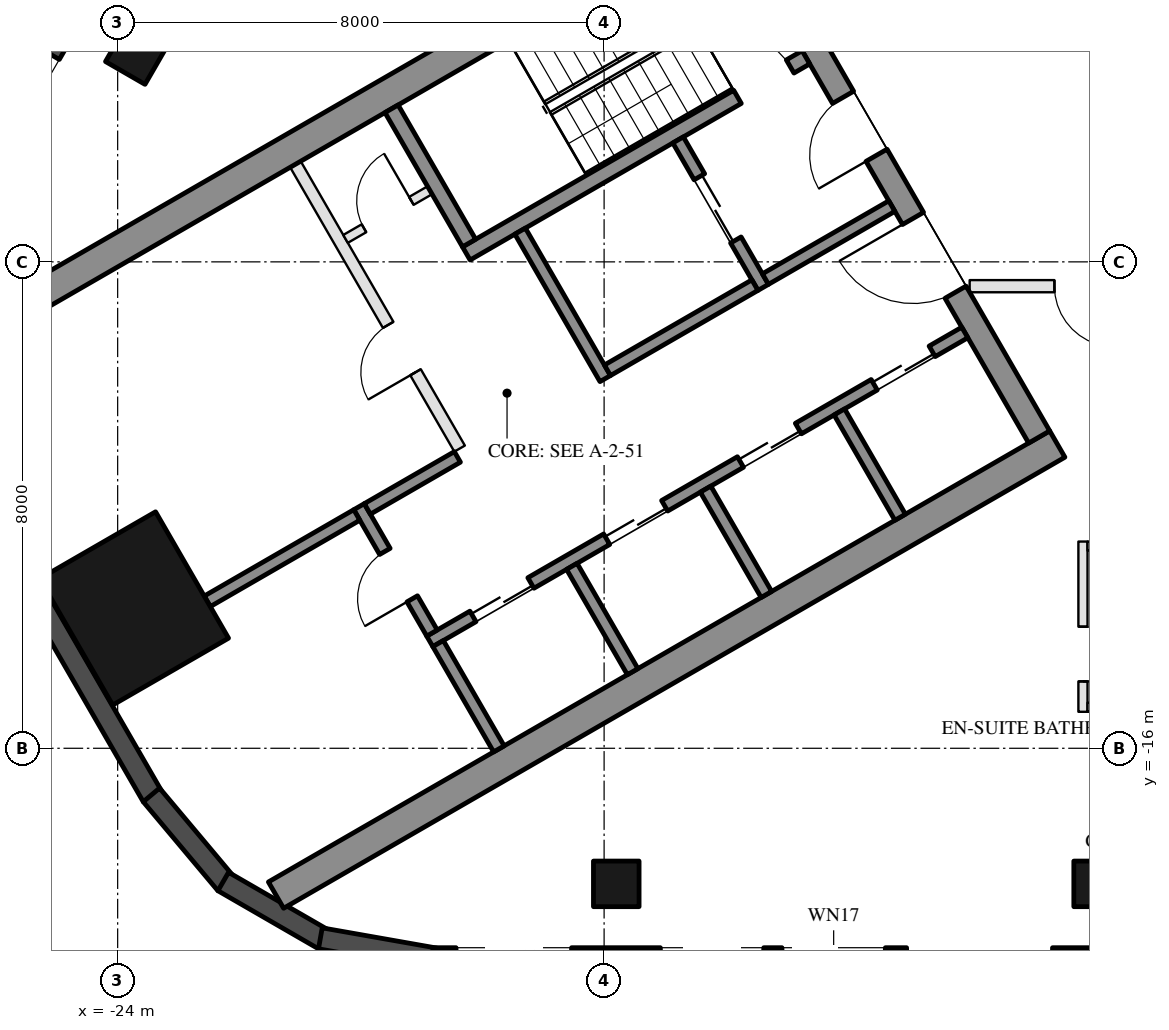
"""IFC4 building model, lengths in metres.
Left out: names, types, materials, properties, quantities, classifications, styles, units other than length and angle.
Written with IfcOpenShell. Run it as: python <this file> out.ifc"""

import sys

from ifc_helpers import new_model, si_unit, direction, frame, frame_2d, origin, origin_2d, place, context, subcontext, project, spatial, rectangle, hollow_rectangle, extrude, element, fill, save


model = new_model("IFC4")
c1 = context("Model", 3, precision=1e-05, world=origin(), true_north=direction((0.0, 1.0)))
c2 = subcontext(c1, "Body", "Model", "MODEL_VIEW")
j1 = project(units=[si_unit("LENGTHUNIT", "METRE"), si_unit("PLANEANGLEUNIT", "RADIAN")], contexts=[c1])
p1 = place(None, origin())
s1 = spatial("IfcSite", under=j1, at=p1, CompositionType="ELEMENT")
p2 = place(p1, origin())
s2 = spatial("IfcBuilding", under=s1, at=p2, CompositionType="ELEMENT")
p3 = place(p2, frame((0.0, 0.0, 220.6)))
s3 = spatial("IfcBuildingStorey", under=s2, at=p3, CompositionType="ELEMENT", Elevation=220.6)
for number, where, z_axis, x_axis in (
    (1, (-15.8, -18.23, 0.0), (0.0, 0.0, 1.0), (-1.0, 0.0, 0.0)),
    (2, (-7.9, -18.23, 0.0), (0.0, 0.0, 1.0), (-1.0, 0.0, 0.0)),
    (3, (-23.688, -4.568, 0.0), (0.0, 0.0, 1.0), (0.5, 0.866, 0.0)),
):
    element("IfcColumn", number, at=place(p3, frame(where, z_axis=z_axis, x_axis=x_axis)), inside=s3, PredefinedType="COLUMN", context=c2, shape_type="SweptSolid", body=[
        extrude(hollow_rectangle(XDim=0.75, YDim=0.75, WallThickness=0.035, at=origin_2d()), origin(), (0.0, 0.0, 1.0), 3.7),
    ])
p4 = place(p3, frame((-23.729, -13.7, 0.0), z_axis=(0.0, 0.0, 1.0), x_axis=(-0.5, 0.866025403784, 0.0)))
e4 = element("IfcColumn", 4, at=p4, inside=s3, PredefinedType="COLUMN", context=c2, shape_type="SweptSolid", body=[
    extrude(hollow_rectangle(XDim=2.4, YDim=2.2, WallThickness=0.06, at=origin_2d()), origin(), (0.0, 0.0, 1.0), 3.7),
])
p5 = place(p3, frame((-24.299, -3.176, 0.0), z_axis=(0.0, 0.0, 1.0), x_axis=(-0.500028278809, -0.866009076391, 0.0)))
e5 = element("IfcWall", 5, at=p5, inside=s3, PredefinedType="SOLIDWALL", context=c2, shape_type="SweptSolid", body=[
    extrude(rectangle(XDim=3.916, YDim=0.35, at=frame_2d((1.958, 0.0))), origin(), (0.0, 0.0, 1.0), 3.55),
])
p6 = place(p5, frame((1.625, 0.0, 0.3)))
e6 = element("IfcOpeningElement", 6, at=p6, cuts=e5, PredefinedType="OPENING", context=c2, shape_type="SweptSolid", body=[
    extrude(rectangle(XDim=1.9, YDim=2.65, at=frame_2d((0.95, 1.325))), frame((0.0, 0.185, 0.0), z_axis=(0.0, -1.0, 0.0), x_axis=(1.0, 0.0, 0.0)), (0.0, 0.0, 1.0), 0.37),
])
p7 = place(p3, frame((-26.257, -11.893, 0.0), z_axis=(0.0, 0.0, 1.0), x_axis=(0.500018773155, -0.866014564827, 0.0)))
e7 = element("IfcWall", 7, at=p7, inside=s3, PredefinedType="SOLIDWALL", context=c2, shape_type="SweptSolid", body=[
    extrude(rectangle(XDim=5.658, YDim=0.35, at=frame_2d((2.829, 0.0))), origin(), (0.0, 0.0, 1.0), 3.55),
])
for number, where, z_axis, x_axis in (
    (8, (-23.445, -16.768, 0.0), (0.0, 0.0, 1.0), (0.643, -0.766, 0.0)),
    (9, (-22.264, -18.192, 0.0), (0.0, 0.0, 1.0), (0.866, -0.5, 0.0)),
):
    element("IfcWall", number, at=place(p3, frame(where, z_axis=z_axis, x_axis=x_axis)), inside=s3, PredefinedType="SOLIDWALL", context=c2, shape_type="SweptSolid", body=[
        extrude(rectangle(XDim=1.91, YDim=0.35, at=frame_2d((0.955, 0.0))), origin(), (0.0, 0.0, 1.0), 3.55),
    ])
p8 = place(p3, frame((-20.667, -19.126, 0.0), z_axis=(0.0, 0.0, 1.0), x_axis=(0.984798995425, -0.173697837091, 0.0)))
e10 = element("IfcWall", 10, at=p8, inside=s3, PredefinedType="SOLIDWALL", context=c2, shape_type="SweptSolid", body=[
    extrude(rectangle(XDim=1.91, YDim=0.35, at=frame_2d((0.955, 0.0))), origin(), (0.0, 0.0, 1.0), 3.55),
])
p9 = place(p3, frame((-18.816, -19.455, 0.0), z_axis=(0.0, 0.0, 1.0), x_axis=(1.0, 0.0, 0.0)))
e11 = element("IfcWall", 11, at=p9, inside=s3, PredefinedType="SOLIDWALL", context=c2, shape_type="SweptSolid", body=[
    extrude(rectangle(XDim=11.816, YDim=0.35, at=frame_2d((5.908, 0.0))), origin(), (0.0, 0.0, 1.0), 3.55),
])
p10 = place(p9, frame((0.381, 0.0, 0.3)))
e12 = element("IfcOpeningElement", 12, at=p10, cuts=e11, PredefinedType="OPENING", context=c2, shape_type="SweptSolid", body=[
    extrude(rectangle(XDim=1.9, YDim=2.65, at=frame_2d((0.95, 1.325))), frame((0.0, 0.185, 0.0), z_axis=(0.0, -1.0, 0.0), x_axis=(1.0, 0.0, 0.0)), (0.0, 0.0, 1.0), 0.37),
])
p11 = place(p9, frame((7.79, 0.0, 0.0)))
e13 = element("IfcOpeningElement", 13, at=p11, cuts=e11, PredefinedType="OPENING", context=c2, shape_type="SweptSolid", body=[
    extrude(rectangle(XDim=2.4, YDim=2.4, at=frame_2d((1.2, 1.2))), frame((0.0, 0.185, 0.0), z_axis=(0.0, -1.0, 0.0), x_axis=(1.0, 0.0, 0.0)), (0.0, 0.0, 1.0), 0.37),
])
p12 = place(p9, frame((3.741, 0.0, 0.3)))
e14 = element("IfcOpeningElement", 14, at=p12, cuts=e11, PredefinedType="OPENING", context=c2, shape_type="SweptSolid", body=[
    extrude(rectangle(XDim=1.7, YDim=2.65, at=frame_2d((0.85, 1.325))), frame((0.0, 0.185, 0.0), z_axis=(0.0, -1.0, 0.0), x_axis=(1.0, 0.0, 0.0)), (0.0, 0.0, 1.0), 0.37),
])
p13 = place(p9, frame((5.741, 0.0, 0.3)))
e15 = element("IfcOpeningElement", 15, at=p13, cuts=e11, PredefinedType="OPENING", context=c2, shape_type="SweptSolid", body=[
    extrude(rectangle(XDim=1.7, YDim=2.65, at=frame_2d((0.85, 1.325))), frame((0.0, 0.185, 0.0), z_axis=(0.0, -1.0, 0.0), x_axis=(1.0, 0.0, 0.0)), (0.0, 0.0, 1.0), 0.37),
])
for number, where, z_axis, x_axis in (
    (16, (-13.797, -1.903, 0.0), (0.0, 0.0, 1.0), (-0.866, -0.5, 0.0)),
    (17, (-8.547, -10.997, 0.0), (0.0, 0.0, 1.0), (-0.866, -0.5, 0.0)),
):
    element("IfcWall", number, at=place(p3, frame(where, z_axis=z_axis, x_axis=x_axis)), inside=s3, PredefinedType="SHEAR", context=c2, shape_type="SweptSolid", body=[
        extrude(rectangle(XDim=14.837, YDim=0.5, at=frame_2d((7.418, 0.0))), origin(), (0.0, 0.0, 1.0), 3.5),
    ])
p14 = place(p3, frame((-13.845, -2.22, 0.0), z_axis=(0.0, 0.0, 1.0), x_axis=(0.500004234368, -0.866022959057, 0.0)))
e18 = element("IfcWall", 18, at=p14, inside=s3, PredefinedType="SHEAR", context=c2, shape_type="SweptSolid", body=[
    extrude(rectangle(XDim=10.0, YDim=0.4, at=frame_2d((5.0, 0.0))), origin(), (0.0, 0.0, 1.0), 3.5),
])
p15 = place(p14, frame((3.55, 0.0, 0.0)))
e19 = element("IfcOpeningElement", 19, at=p15, cuts=e18, PredefinedType="OPENING", context=c2, shape_type="SweptSolid", body=[
    extrude(rectangle(XDim=1.1, YDim=2.1, at=frame_2d((0.55, 1.05))), frame((0.0, 0.21, 0.0), z_axis=(0.0, -1.0, 0.0), x_axis=(1.0, 0.0, 0.0)), (0.0, 0.0, 1.0), 0.42),
])
p16 = place(p14, frame((5.85, 0.0, 0.0)))
e20 = element("IfcOpeningElement", 20, at=p16, cuts=e18, PredefinedType="OPENING", context=c2, shape_type="SweptSolid", body=[
    extrude(rectangle(XDim=1.4, YDim=2.1, at=frame_2d((0.7, 1.05))), frame((0.0, 0.21, 0.0), z_axis=(0.0, -1.0, 0.0), x_axis=(1.0, 0.0, 0.0)), (0.0, 0.0, 1.0), 0.42),
])
p17 = place(p3, frame((-12.681, -4.636, 0.0), z_axis=(0.0, 0.0, 1.0), x_axis=(-0.866021702275, -0.500006411147, 0.0)))
e21 = element("IfcWall", 21, at=p17, inside=s3, PredefinedType="SHEAR", context=c2, shape_type="SweptSolid", body=[
    extrude(rectangle(XDim=6.45, YDim=0.25, at=frame_2d((3.225, 0.0))), origin(), (0.0, 0.0, 1.0), 3.5),
])
p18 = place(p17, frame((0.3, 0.0, 0.0)))
e22 = element("IfcOpeningElement", 22, at=p18, cuts=e21, PredefinedType="OPENING", context=c2, shape_type="SweptSolid", body=[
    extrude(rectangle(XDim=1.0, YDim=2.1, at=frame_2d((0.5, 1.05))), frame((0.0, 0.135, 0.0), z_axis=(0.0, -1.0, 0.0), x_axis=(1.0, 0.0, 0.0)), (0.0, 0.0, 1.0), 0.27),
])
p19 = place(p3, frame((-19.496, -5.482, 0.0), z_axis=(0.0, 0.0, 1.0), x_axis=(0.499990435942, -0.866030925526, 0.0)))
e23 = element("IfcWall", 23, at=p19, inside=s3, PredefinedType="SHEAR", context=c2, shape_type="SweptSolid", body=[
    extrude(rectangle(XDim=2.55, YDim=0.25, at=frame_2d((1.275, 0.0))), origin(), (0.0, 0.0, 1.0), 3.5),
])
p20 = place(p3, frame((-17.381, -7.495, 0.0), z_axis=(0.0, 0.0, 1.0), x_axis=(0.500011755427, -0.866018616679, 0.0)))
e24 = element("IfcWall", 24, at=p20, inside=s3, PredefinedType="SHEAR", context=c2, shape_type="SweptSolid", body=[
    extrude(rectangle(XDim=2.8, YDim=0.2, at=frame_2d((1.4, 0.0))), origin(), (0.0, 0.0, 1.0), 3.5),
])
p21 = place(p3, frame((-14.783, -5.995, 0.0), z_axis=(0.0, 0.0, 1.0), x_axis=(0.49994636267, -0.866056369097, 0.0)))
e25 = element("IfcWall", 25, at=p21, inside=s3, PredefinedType="SHEAR", context=c2, shape_type="SweptSolid", body=[
    extrude(rectangle(XDim=2.8, YDim=0.2, at=frame_2d((1.4, 0.0))), origin(), (0.0, 0.0, 1.0), 3.5),
])
p22 = place(p21, frame((0.7, 0.0, 0.0)))
e26 = element("IfcOpeningElement", 26, at=p22, cuts=e25, PredefinedType="OPENING", context=c2, shape_type="SweptSolid", body=[
    extrude(rectangle(XDim=1.2, YDim=2.1, at=frame_2d((0.6, 1.05))), frame((0.0, 0.11, 0.0), z_axis=(0.0, -1.0, 0.0), x_axis=(1.0, 0.0, 0.0)), (0.0, 0.0, 1.0), 0.22),
])
p23 = place(p3, frame((-13.52, -8.383, 0.0), z_axis=(0.0, 0.0, 1.0), x_axis=(-0.866034573852, -0.49998411664, 0.0)))
e27 = element("IfcWall", 27, at=p23, inside=s3, PredefinedType="SHEAR", context=c2, shape_type="SweptSolid", body=[
    extrude(rectangle(XDim=2.8, YDim=0.2, at=frame_2d((1.4, 0.0))), origin(), (0.0, 0.0, 1.0), 3.5),
])
p24 = place(p3, frame((-11.268, -7.083, 0.0), z_axis=(0.0, 0.0, 1.0), x_axis=(-0.866050077142, -0.499957262057, 0.0)))
e28 = element("IfcWall", 28, at=p24, inside=s3, PredefinedType="SHEAR", context=c2, shape_type="SweptSolid", body=[
    extrude(rectangle(XDim=2.4, YDim=0.2, at=frame_2d((1.2, 0.0))), origin(), (0.0, 0.0, 1.0), 3.5),
])
p25 = place(p3, frame((-10.068, -9.162, 0.0), z_axis=(0.0, 0.0, 1.0), x_axis=(-0.866032725843, -0.499987317609, 0.0)))
e29 = element("IfcWall", 29, at=p25, inside=s3, PredefinedType="SHEAR", context=c2, shape_type="SweptSolid", body=[
    extrude(rectangle(XDim=10.16, YDim=0.2, at=frame_2d((5.08, 0.0))), origin(), (0.0, 0.0, 1.0), 3.5),
])
p26 = place(p25, frame((0.62, 0.0, 0.0)))
e30 = element("IfcOpeningElement", 30, at=p26, cuts=e29, PredefinedType="OPENING", context=c2, shape_type="SweptSolid", body=[
    extrude(rectangle(XDim=1.1, YDim=2.1, at=frame_2d((0.55, 1.05))), frame((0.0, 0.11, 0.0), z_axis=(0.0, -1.0, 0.0), x_axis=(1.0, 0.0, 0.0)), (0.0, 0.0, 1.0), 0.22),
])
p27 = place(p25, frame((3.16, 0.0, 0.0)))
e31 = element("IfcOpeningElement", 31, at=p27, cuts=e29, PredefinedType="OPENING", context=c2, shape_type="SweptSolid", body=[
    extrude(rectangle(XDim=1.1, YDim=2.1, at=frame_2d((0.55, 1.05))), frame((0.0, 0.11, 0.0), z_axis=(0.0, -1.0, 0.0), x_axis=(1.0, 0.0, 0.0)), (0.0, 0.0, 1.0), 0.22),
])
p28 = place(p25, frame((5.7, 0.0, 0.0)))
e32 = element("IfcOpeningElement", 32, at=p28, cuts=e29, PredefinedType="OPENING", context=c2, shape_type="SweptSolid", body=[
    extrude(rectangle(XDim=1.1, YDim=2.1, at=frame_2d((0.55, 1.05))), frame((0.0, 0.11, 0.0), z_axis=(0.0, -1.0, 0.0), x_axis=(1.0, 0.0, 0.0)), (0.0, 0.0, 1.0), 0.22),
])
p29 = place(p25, frame((8.24, 0.0, 0.0)))
e33 = element("IfcOpeningElement", 33, at=p29, cuts=e29, PredefinedType="OPENING", context=c2, shape_type="SweptSolid", body=[
    extrude(rectangle(XDim=1.1, YDim=2.1, at=frame_2d((0.55, 1.05))), frame((0.0, 0.11, 0.0), z_axis=(0.0, -1.0, 0.0), x_axis=(1.0, 0.0, 0.0)), (0.0, 0.0, 1.0), 0.22),
])
p30 = place(p3, frame((-20.031, -12.026, 0.0), z_axis=(0.0, 0.0, 1.0), x_axis=(0.500033551112, -0.866006032174, 0.0)))
e34 = element("IfcWall", 34, at=p30, inside=s3, PredefinedType="SHEAR", context=c2, shape_type="SweptSolid", body=[
    extrude(rectangle(XDim=2.4, YDim=0.2, at=frame_2d((1.2, 0.0))), origin(), (0.0, 0.0, 1.0), 3.5),
])
p31 = place(p30, frame((0.85, 0.0, 0.0)))
e35 = element("IfcOpeningElement", 35, at=p31, cuts=e34, PredefinedType="OPENING", context=c2, shape_type="SweptSolid", body=[
    extrude(rectangle(XDim=0.9, YDim=2.1, at=frame_2d((0.45, 1.05))), frame((0.0, 0.11, 0.0), z_axis=(0.0, -1.0, 0.0), x_axis=(1.0, 0.0, 0.0)), (0.0, 0.0, 1.0), 0.22),
])
p32 = place(p3, frame((-18.413, -11.208, 0.0), z_axis=(0.0, 0.0, 1.0), x_axis=(-0.866038183914, -0.499977863513, 0.0)))
e36 = element("IfcWall", 36, at=p32, inside=s3, PredefinedType="SHEAR", context=c2, shape_type="SweptSolid", body=[
    extrude(rectangle(XDim=1.71, YDim=0.2, at=frame_2d((0.855, 0.0))), origin(), (0.0, 0.0, 1.0), 3.5),
])
for number, where, z_axis, x_axis in (
    (37, (-12.131, -10.468, 0.0), (0.0, 0.0, 1.0), (0.5, -0.866, 0.0)),
    (38, (-14.331, -11.738, 0.0), (0.0, 0.0, 1.0), (0.5, -0.866, 0.0)),
    (39, (-16.531, -13.008, 0.0), (0.0, 0.0, 1.0), (0.5, -0.866, 0.0)),
    (40, (-18.73, -14.278, 0.0), (0.0, 0.0, 1.0), (0.5, -0.866, 0.0)),
):
    element("IfcWall", number, at=place(p3, frame(where, z_axis=z_axis, x_axis=x_axis)), inside=s3, PredefinedType="SHEAR", context=c2, shape_type="SweptSolid", body=[
        extrude(rectangle(XDim=2.0, YDim=0.2, at=frame_2d((1.0, 0.0))), origin(), (0.0, 0.0, 1.0), 3.5),
    ])
p33 = place(p3, frame((-20.067, -12.163, 0.0), z_axis=(0.0, 0.0, 1.0), x_axis=(-0.866055327414, -0.49994816717, 0.0)))
e41 = element("IfcWall", 41, at=p33, inside=s3, PredefinedType="SHEAR", context=c2, shape_type="SweptSolid", body=[
    extrude(rectangle(XDim=2.84, YDim=0.2, at=frame_2d((1.42, 0.0))), origin(), (0.0, 0.0, 1.0), 3.5),
])
p34 = place(p3, frame((-21.076, -6.395, 0.0), z_axis=(0.0, 0.0, 1.0), x_axis=(0.50001468107, -0.866016927499, 0.0)))
e42 = element("IfcWall", 42, at=p34, inside=s3, PredefinedType="PARTITIONING", context=c2, shape_type="SweptSolid", body=[
    extrude(rectangle(XDim=5.4, YDim=0.2, at=frame_2d((2.7, 0.0))), origin(), (0.0, 0.0, 1.0), 3.5),
])
p35 = place(p34, frame((3.05, 0.0, 0.0)))
e43 = element("IfcOpeningElement", 43, at=p35, cuts=e42, PredefinedType="OPENING", context=c2, shape_type="SweptSolid", body=[
    extrude(rectangle(XDim=0.9, YDim=2.1, at=frame_2d((0.45, 1.05))), frame((0.0, 0.11, 0.0), z_axis=(0.0, -1.0, 0.0), x_axis=(1.0, 0.0, 0.0)), (0.0, 0.0, 1.0), 0.22),
])
p36 = place(p3, frame((-18.866, -6.822, 0.0), z_axis=(0.0, 0.0, 1.0), x_axis=(-0.866028054938, -0.499995408039, 0.0)))
e44 = element("IfcWall", 44, at=p36, inside=s3, PredefinedType="PARTITIONING", context=c2, shape_type="SweptSolid", body=[
    extrude(rectangle(XDim=1.6, YDim=0.15, at=frame_2d((0.8, 0.0))), origin(), (0.0, 0.0, 1.0), 3.5),
])
p37 = place(p36, frame((0.35, 0.0, 0.0)))
e45 = element("IfcOpeningElement", 45, at=p37, cuts=e44, PredefinedType="OPENING", context=c2, shape_type="SweptSolid", body=[
    extrude(rectangle(XDim=0.9, YDim=2.1, at=frame_2d((0.45, 1.05))), frame((0.0, 0.085, 0.0), z_axis=(0.0, -1.0, 0.0), x_axis=(1.0, 0.0, 0.0)), (0.0, 0.0, 1.0), 0.17),
])
p38 = place(p3, frame((-6.2, -8.4, 0.0), z_axis=(0.0, 0.0, 1.0), x_axis=(-1.0, 0.0, 0.0)))
e46 = element("IfcWall", 46, at=p38, inside=s3, PredefinedType="PARTITIONING", context=c2, shape_type="SweptSolid", body=[
    extrude(rectangle(XDim=3.788, YDim=0.2, at=frame_2d((1.894, 0.0))), origin(), (0.0, 0.0, 1.0), 2.95),
])
p39 = place(p38, frame((1.394, 0.0, 0.0)))
e47 = element("IfcOpeningElement", 47, at=p39, cuts=e46, PredefinedType="OPENING", context=c2, shape_type="SweptSolid", body=[
    extrude(rectangle(XDim=1.0, YDim=2.1, at=frame_2d((0.5, 1.05))), frame((0.0, 0.11, 0.0), z_axis=(0.0, -1.0, 0.0), x_axis=(1.0, 0.0, 0.0)), (0.0, 0.0, 1.0), 0.22),
])
p40 = place(p3, frame((-8.125, -12.6, 0.0), z_axis=(0.0, 0.0, 1.0), x_axis=(0.0, -1.0, 0.0)))
e48 = element("IfcWall", 48, at=p40, inside=s3, PredefinedType="PARTITIONING", context=c2, shape_type="SweptSolid", body=[
    extrude(rectangle(XDim=2.8, YDim=0.15, at=frame_2d((1.4, 0.0))), origin(), (0.0, 0.0, 1.0), 3.55),
])
p41 = place(p40, frame((1.4, 0.0, 0.0)))
e49 = element("IfcOpeningElement", 49, at=p41, cuts=e48, PredefinedType="OPENING", context=c2, shape_type="SweptSolid", body=[
    extrude(rectangle(XDim=0.9, YDim=2.1, at=frame_2d((0.45, 1.05))), frame((0.0, 0.085, 0.0), z_axis=(0.0, -1.0, 0.0), x_axis=(1.0, 0.0, 0.0)), (0.0, 0.0, 1.0), 0.17),
])
for number, where, z_axis, x_axis in (
    (50, (-8.05, -15.325, 0.0), (0.0, 0.0, 1.0), (1.0, 0.0, 0.0)),
    (51, (-8.05, -12.675, 0.0), (0.0, 0.0, 1.0), (1.0, 0.0, 0.0)),
):
    element("IfcWall", number, at=place(p3, frame(where, z_axis=z_axis, x_axis=x_axis)), inside=s3, PredefinedType="PARTITIONING", context=c2, shape_type="SweptSolid", body=[
        extrude(rectangle(XDim=1.85, YDim=0.15, at=frame_2d((0.925, 0.0))), origin(), (0.0, 0.0, 1.0), 2.95),
    ])
p42 = place(p22, origin())
e52 = element("IfcDoor", 52, at=p42, inside=s3, OperationType="DOUBLE_DOOR_SLIDING", PredefinedType="DOOR", context=c2, shape_type="SweptSolid", body=[
    extrude(rectangle(XDim=1.2, YDim=2.1, at=frame_2d((0.6, 1.05))), frame((0.0, 0.025, 0.0), z_axis=(0.0, -1.0, 0.0), x_axis=(1.0, 0.0, 0.0)), (0.0, 0.0, 1.0), 0.05),
])
fill(e26, e52)
p43 = place(p37, frame((0.9, 0.0, 0.0), z_axis=(0.0, 0.0, 1.0), x_axis=(-1.0, 0.0, 0.0)))
e53 = element("IfcDoor", 53, at=p43, inside=s3, OperationType="SINGLE_SWING_RIGHT", PredefinedType="DOOR", context=c2, shape_type="SweptSolid", body=[
    extrude(rectangle(XDim=0.9, YDim=2.1, at=frame_2d((0.45, 1.05))), frame((0.0, 0.025, 0.0), z_axis=(0.0, -1.0, 0.0), x_axis=(1.0, 0.0, 0.0)), (0.0, 0.0, 1.0), 0.05),
])
fill(e45, e53)
p44 = place(p26, origin())
e54 = element("IfcDoor", 54, at=p44, inside=s3, OperationType="DOUBLE_DOOR_SLIDING", PredefinedType="DOOR", context=c2, shape_type="SweptSolid", body=[
    extrude(rectangle(XDim=1.1, YDim=2.1, at=frame_2d((0.55, 1.05))), frame((0.0, 0.025, 0.0), z_axis=(0.0, -1.0, 0.0), x_axis=(1.0, 0.0, 0.0)), (0.0, 0.0, 1.0), 0.05),
])
fill(e30, e54)
p45 = place(p27, origin())
e55 = element("IfcDoor", 55, at=p45, inside=s3, OperationType="DOUBLE_DOOR_SLIDING", PredefinedType="DOOR", context=c2, shape_type="SweptSolid", body=[
    extrude(rectangle(XDim=1.1, YDim=2.1, at=frame_2d((0.55, 1.05))), frame((0.0, 0.025, 0.0), z_axis=(0.0, -1.0, 0.0), x_axis=(1.0, 0.0, 0.0)), (0.0, 0.0, 1.0), 0.05),
])
fill(e31, e55)
p46 = place(p28, origin())
e56 = element("IfcDoor", 56, at=p46, inside=s3, OperationType="DOUBLE_DOOR_SLIDING", PredefinedType="DOOR", context=c2, shape_type="SweptSolid", body=[
    extrude(rectangle(XDim=1.1, YDim=2.1, at=frame_2d((0.55, 1.05))), frame((0.0, 0.025, 0.0), z_axis=(0.0, -1.0, 0.0), x_axis=(1.0, 0.0, 0.0)), (0.0, 0.0, 1.0), 0.05),
])
fill(e32, e56)
p47 = place(p29, origin())
e57 = element("IfcDoor", 57, at=p47, inside=s3, OperationType="DOUBLE_DOOR_SLIDING", PredefinedType="DOOR", context=c2, shape_type="SweptSolid", body=[
    extrude(rectangle(XDim=1.1, YDim=2.1, at=frame_2d((0.55, 1.05))), frame((0.0, 0.025, 0.0), z_axis=(0.0, -1.0, 0.0), x_axis=(1.0, 0.0, 0.0)), (0.0, 0.0, 1.0), 0.05),
])
fill(e33, e57)
p48 = place(p31, frame((0.9, 0.0, 0.0), z_axis=(0.0, 0.0, 1.0), x_axis=(-1.0, 0.0, 0.0)))
e58 = element("IfcDoor", 58, at=p48, inside=s3, OperationType="SINGLE_SWING_LEFT", PredefinedType="DOOR", context=c2, shape_type="SweptSolid", body=[
    extrude(rectangle(XDim=0.9, YDim=2.1, at=frame_2d((0.45, 1.05))), frame((0.0, 0.025, 0.0), z_axis=(0.0, -1.0, 0.0), x_axis=(1.0, 0.0, 0.0)), (0.0, 0.0, 1.0), 0.05),
])
fill(e35, e58)
p49 = place(p35, frame((0.9, 0.0, 0.0), z_axis=(0.0, 0.0, 1.0), x_axis=(-1.0, 0.0, 0.0)))
e59 = element("IfcDoor", 59, at=p49, inside=s3, OperationType="SINGLE_SWING_LEFT", PredefinedType="DOOR", context=c2, shape_type="SweptSolid", body=[
    extrude(rectangle(XDim=0.9, YDim=2.1, at=frame_2d((0.45, 1.05))), frame((0.0, 0.025, 0.0), z_axis=(0.0, -1.0, 0.0), x_axis=(1.0, 0.0, 0.0)), (0.0, 0.0, 1.0), 0.05),
])
fill(e43, e59)
p50 = place(p15, frame((1.1, 0.0, 0.0), z_axis=(0.0, 0.0, 1.0), x_axis=(-1.0, 0.0, 0.0)))
e60 = element("IfcDoor", 60, at=p50, inside=s3, OperationType="SINGLE_SWING_LEFT", PredefinedType="DOOR", context=c2, shape_type="SweptSolid", body=[
    extrude(rectangle(XDim=1.1, YDim=2.1, at=frame_2d((0.55, 1.05))), frame((0.0, 0.025, 0.0), z_axis=(0.0, -1.0, 0.0), x_axis=(1.0, 0.0, 0.0)), (0.0, 0.0, 1.0), 0.05),
])
fill(e19, e60)
p51 = place(p16, frame((1.4, 0.0, 0.0), z_axis=(0.0, 0.0, 1.0), x_axis=(-1.0, 0.0, 0.0)))
e61 = element("IfcDoor", 61, at=p51, inside=s3, OperationType="DOUBLE_DOOR_SINGLE_SWING", PredefinedType="DOOR", context=c2, shape_type="SweptSolid", body=[
    extrude(rectangle(XDim=1.4, YDim=2.1, at=frame_2d((0.7, 1.05))), frame((0.0, 0.025, 0.0), z_axis=(0.0, -1.0, 0.0), x_axis=(1.0, 0.0, 0.0)), (0.0, 0.0, 1.0), 0.05),
])
fill(e20, e61)
p52 = place(p18, frame((1.0, 0.0, 0.0), z_axis=(0.0, 0.0, 1.0), x_axis=(-1.0, 0.0, 0.0)))
e62 = element("IfcDoor", 62, at=p52, inside=s3, OperationType="SINGLE_SWING_LEFT", PredefinedType="DOOR", context=c2, shape_type="SweptSolid", body=[
    extrude(rectangle(XDim=1.0, YDim=2.1, at=frame_2d((0.5, 1.05))), frame((0.0, 0.025, 0.0), z_axis=(0.0, -1.0, 0.0), x_axis=(1.0, 0.0, 0.0)), (0.0, 0.0, 1.0), 0.05),
])
fill(e22, e62)
p53 = place(p41, origin())
e63 = element("IfcDoor", 63, at=p53, inside=s3, OperationType="SINGLE_SWING_RIGHT", PredefinedType="DOOR", context=c2, shape_type="SweptSolid", body=[
    extrude(rectangle(XDim=0.9, YDim=2.1, at=frame_2d((0.45, 1.05))), frame((0.0, 0.025, 0.0), z_axis=(0.0, -1.0, 0.0), x_axis=(1.0, 0.0, 0.0)), (0.0, 0.0, 1.0), 0.05),
])
fill(e49, e63)
p54 = place(p39, origin())
e64 = element("IfcDoor", 64, at=p54, inside=s3, OperationType="SINGLE_SWING_LEFT", PredefinedType="DOOR", context=c2, shape_type="SweptSolid", body=[
    extrude(rectangle(XDim=1.0, YDim=2.1, at=frame_2d((0.5, 1.05))), frame((0.0, 0.025, 0.0), z_axis=(0.0, -1.0, 0.0), x_axis=(1.0, 0.0, 0.0)), (0.0, 0.0, 1.0), 0.05),
])
fill(e47, e64)
save(model, sys.argv[1])
